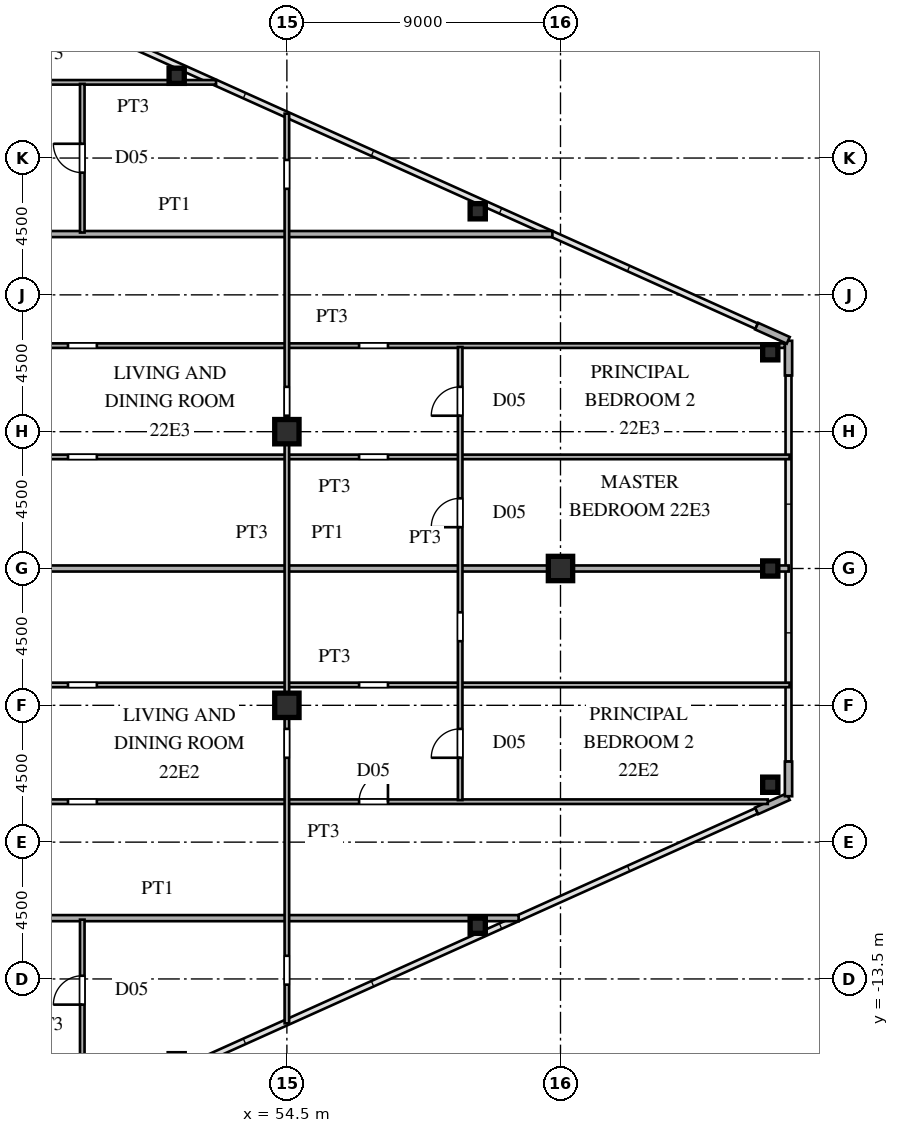
"""IFC4 building model, lengths in metres.
Left out: names, types, materials, properties, quantities, classifications, styles, units other than length and angle.
Written with IfcOpenShell. Run it as: python <this file> out.ifc"""

import sys

from ifc_helpers import new_model, si_unit, direction, frame, frame_2d, origin, origin_2d, place, context, subcontext, project, spatial, rectangle, hollow_rectangle, i_section, extrude, source, transform, mapped, element, fill, save


model = new_model("IFC4")
c1 = context("Model", 3, precision=1e-05, world=origin(), true_north=direction((0.0, 1.0)))
c2 = subcontext(c1, "Body", "Model", "MODEL_VIEW")
j1 = project(units=[si_unit("LENGTHUNIT", "METRE"), si_unit("PLANEANGLEUNIT", "RADIAN")], contexts=[c1])
p1 = place(None, origin())
s1 = spatial("IfcSite", under=j1, at=p1, CompositionType="ELEMENT")
p2 = place(p1, origin())
s2 = spatial("IfcBuilding", under=s1, at=p2, CompositionType="ELEMENT")
p3 = place(p2, frame((0.0, 0.0, 83.7)))
s3 = spatial("IfcBuildingStorey", under=s2, at=p3, CompositionType="ELEMENT", Elevation=83.7)
m1 = source(origin(), c2, "Body", "SweptSolid", [
    extrude(i_section(OverallWidth=0.8, OverallDepth=0.8, WebThickness=0.032, FlangeThickness=0.05, at=origin_2d()), origin(), (0.0, 0.0, 1.0), 3.6),
])
for number, where, z_axis, x_axis in (
    (1, (54.5, -4.5, 0.0), (0.0, 0.0, 1.0), (1.0, 0.0, 0.0)),
    (2, (54.5, 4.5, 0.0), (0.0, 0.0, 1.0), (1.0, 0.0, 0.0)),
    (3, (63.5, 0.0, 0.0), (0.0, 0.0, 1.0), (1.0, 0.0, 0.0)),
):
    element("IfcColumn", number, at=place(p3, frame(where, z_axis=z_axis, x_axis=x_axis)), inside=s3, PredefinedType="COLUMN", context=c2, shape_type="MappedRepresentation", body=[
        mapped(m1, transform((0.0, 0.0, 0.0), scale=1.0)),
    ])
m2 = source(origin(), c2, "Body", "SweptSolid", [
    extrude(hollow_rectangle(XDim=0.5, YDim=0.5, WallThickness=0.02, at=origin_2d()), origin(), (0.0, 0.0, 1.0), 3.6),
])
for number, where, z_axis, x_axis in (
    (4, (70.4, -7.112, 0.0), (0.0, 0.0, 1.0), (1.0, 0.0, 0.0)),
    (5, (70.4, 7.112, 0.0), (0.0, 0.0, 1.0), (1.0, 0.0, 0.0)),
    (6, (60.778, -11.749, 0.0), (0.0, 0.0, 1.0), (1.0, 0.0, 0.0)),
    (7, (50.875, 16.205, 0.0), (0.0, 0.0, 1.0), (1.0, 0.0, 0.0)),
    (8, (60.778, 11.749, 0.0), (0.0, 0.0, 1.0), (1.0, 0.0, 0.0)),
    (9, (70.4, 0.0, 0.0), (0.0, 0.0, 1.0), (1.0, 0.0, 0.0)),
):
    element("IfcColumn", number, at=place(p3, frame(where, z_axis=z_axis, x_axis=x_axis)), inside=s3, PredefinedType="COLUMN", context=c2, shape_type="MappedRepresentation", body=[
        mapped(m2, transform((0.0, 0.0, 0.0), scale=1.0)),
    ])
for number, where, z_axis, x_axis in (
    (10, (69.951, -7.972, 0.0), (0.0, 0.0, 1.0), (0.912, 0.41, 0.0)),
    (11, (71.0, -7.49, 0.0), (0.0, 0.0, 1.0), (0.0, 1.0, 0.0)),
    (12, (71.0, 6.35, 0.0), (0.0, 0.0, 1.0), (0.0, 1.0, 0.0)),
    (13, (70.991, 7.504, 0.0), (0.0, 0.0, 1.0), (-0.912, 0.41, 0.0)),
):
    element("IfcWall", number, at=place(p3, frame(where, z_axis=z_axis, x_axis=x_axis)), inside=s3, PredefinedType="SOLIDWALL", context=c2, shape_type="SweptSolid", body=[
        extrude(rectangle(XDim=1.14, YDim=0.24, at=frame_2d((0.57, 0.0))), origin(), (0.0, 0.0, 1.0), 3.34),
    ])
p4 = place(p3, frame((38.38, -11.5, 0.0), z_axis=(0.0, 0.0, 1.0), x_axis=(1.0, 0.0, 0.0)))
e14 = element("IfcWall", 14, at=p4, inside=s3, PredefinedType="PARTITIONING", context=c2, shape_type="SweptSolid", body=[
    extrude(rectangle(XDim=23.743, YDim=0.2, at=frame_2d((11.872, 0.0))), origin(), (0.0, 0.0, 1.0), 3.34),
])
p5 = place(p3, frame((41.1, -7.67, 0.0), z_axis=(0.0, 0.0, 1.0), x_axis=(1.0, 0.0, 0.0)))
e15 = element("IfcWall", 15, at=p5, inside=s3, PredefinedType="PARTITIONING", context=c2, shape_type="SweptSolid", body=[
    extrude(rectangle(XDim=29.218, YDim=0.15, at=frame_2d((14.609, 0.0))), origin(), (0.0, 0.0, 1.0), 3.34),
])
p6 = place(p5, frame((6.2, 0.0, 0.0)))
e16 = element("IfcOpeningElement", 16, at=p6, cuts=e15, PredefinedType="OPENING", context=c2, shape_type="SweptSolid", body=[
    extrude(rectangle(XDim=0.95, YDim=2.15, at=frame_2d((0.475, 1.075))), frame((0.0, 0.085, 0.0), z_axis=(0.0, -1.0, 0.0), x_axis=(1.0, 0.0, 0.0)), (0.0, 0.0, 1.0), 0.17),
])
p7 = place(p5, frame((15.775, 0.0, 0.0)))
e17 = element("IfcOpeningElement", 17, at=p7, cuts=e15, PredefinedType="OPENING", context=c2, shape_type="SweptSolid", body=[
    extrude(rectangle(XDim=0.95, YDim=2.15, at=frame_2d((0.475, 1.075))), frame((0.0, 0.085, 0.0), z_axis=(0.0, -1.0, 0.0), x_axis=(1.0, 0.0, 0.0)), (0.0, 0.0, 1.0), 0.17),
])
p8 = place(p3, frame((41.1, -3.83, 0.0), z_axis=(0.0, 0.0, 1.0), x_axis=(1.0, 0.0, 0.0)))
e18 = element("IfcWall", 18, at=p8, inside=s3, PredefinedType="PARTITIONING", context=c2, shape_type="SweptSolid", body=[
    extrude(rectangle(XDim=29.935, YDim=0.15, at=frame_2d((14.967, 0.0))), origin(), (0.0, 0.0, 1.0), 3.34),
])
p9 = place(p8, frame((6.2, 0.0, 0.0)))
e19 = element("IfcOpeningElement", 19, at=p9, cuts=e18, PredefinedType="OPENING", context=c2, shape_type="SweptSolid", body=[
    extrude(rectangle(XDim=0.95, YDim=2.15, at=frame_2d((0.475, 1.075))), frame((0.0, 0.085, 0.0), z_axis=(0.0, -1.0, 0.0), x_axis=(1.0, 0.0, 0.0)), (0.0, 0.0, 1.0), 0.17),
])
p10 = place(p8, frame((15.775, 0.0, 0.0)))
e20 = element("IfcOpeningElement", 20, at=p10, cuts=e18, PredefinedType="OPENING", context=c2, shape_type="SweptSolid", body=[
    extrude(rectangle(XDim=0.95, YDim=2.15, at=frame_2d((0.475, 1.075))), frame((0.0, 0.085, 0.0), z_axis=(0.0, -1.0, 0.0), x_axis=(1.0, 0.0, 0.0)), (0.0, 0.0, 1.0), 0.17),
])
p11 = place(p3, frame((38.38, 0.0, 0.0), z_axis=(0.0, 0.0, 1.0), x_axis=(1.0, 0.0, 0.0)))
e21 = element("IfcWall", 21, at=p11, inside=s3, PredefinedType="PARTITIONING", context=c2, shape_type="SweptSolid", body=[
    extrude(rectangle(XDim=25.1, YDim=0.2, at=frame_2d((12.55, 0.0))), origin(), (0.0, 0.0, 1.0), 3.34),
])
p12 = place(p3, frame((63.48, 0.0, 0.0), z_axis=(0.0, 0.0, 1.0), x_axis=(1.0, 0.0, 0.0)))
e22 = element("IfcWall", 22, at=p12, inside=s3, PredefinedType="PARTITIONING", context=c2, shape_type="SweptSolid", body=[
    extrude(rectangle(XDim=7.525, YDim=0.2, at=frame_2d((3.762, 0.0))), origin(), (0.0, 0.0, 1.0), 2.44),
])
p13 = place(p3, frame((41.1, 3.67, 0.0), z_axis=(0.0, 0.0, 1.0), x_axis=(1.0, 0.0, 0.0)))
e23 = element("IfcWall", 23, at=p13, inside=s3, PredefinedType="PARTITIONING", context=c2, shape_type="SweptSolid", body=[
    extrude(rectangle(XDim=29.935, YDim=0.15, at=frame_2d((14.967, 0.0))), origin(), (0.0, 0.0, 1.0), 3.34),
])
p14 = place(p13, frame((6.2, 0.0, 0.0)))
e24 = element("IfcOpeningElement", 24, at=p14, cuts=e23, PredefinedType="OPENING", context=c2, shape_type="SweptSolid", body=[
    extrude(rectangle(XDim=0.95, YDim=2.15, at=frame_2d((0.475, 1.075))), frame((0.0, 0.085, 0.0), z_axis=(0.0, -1.0, 0.0), x_axis=(1.0, 0.0, 0.0)), (0.0, 0.0, 1.0), 0.17),
])
p15 = place(p13, frame((15.775, 0.0, 0.0)))
e25 = element("IfcOpeningElement", 25, at=p15, cuts=e23, PredefinedType="OPENING", context=c2, shape_type="SweptSolid", body=[
    extrude(rectangle(XDim=0.95, YDim=2.15, at=frame_2d((0.475, 1.075))), frame((0.0, 0.085, 0.0), z_axis=(0.0, -1.0, 0.0), x_axis=(1.0, 0.0, 0.0)), (0.0, 0.0, 1.0), 0.17),
])
p16 = place(p3, frame((41.1, 7.33, 0.0), z_axis=(0.0, 0.0, 1.0), x_axis=(1.0, 0.0, 0.0)))
e26 = element("IfcWall", 26, at=p16, inside=s3, PredefinedType="PARTITIONING", context=c2, shape_type="SweptSolid", body=[
    extrude(rectangle(XDim=29.775, YDim=0.15, at=frame_2d((14.887, 0.0))), origin(), (0.0, 0.0, 1.0), 3.34),
])
p17 = place(p16, frame((6.2, 0.0, 0.0)))
e27 = element("IfcOpeningElement", 27, at=p17, cuts=e26, PredefinedType="OPENING", context=c2, shape_type="SweptSolid", body=[
    extrude(rectangle(XDim=0.95, YDim=2.15, at=frame_2d((0.475, 1.075))), frame((0.0, 0.085, 0.0), z_axis=(0.0, -1.0, 0.0), x_axis=(1.0, 0.0, 0.0)), (0.0, 0.0, 1.0), 0.17),
])
p18 = place(p16, frame((15.775, 0.0, 0.0)))
e28 = element("IfcOpeningElement", 28, at=p18, cuts=e26, PredefinedType="OPENING", context=c2, shape_type="SweptSolid", body=[
    extrude(rectangle(XDim=0.95, YDim=2.15, at=frame_2d((0.475, 1.075))), frame((0.0, 0.085, 0.0), z_axis=(0.0, -1.0, 0.0), x_axis=(1.0, 0.0, 0.0)), (0.0, 0.0, 1.0), 0.17),
])
p19 = place(p3, frame((38.38, 11.0, 0.0), z_axis=(0.0, 0.0, 1.0), x_axis=(1.0, 0.0, 0.0)))
e29 = element("IfcWall", 29, at=p19, inside=s3, PredefinedType="PARTITIONING", context=c2, shape_type="SweptSolid", body=[
    extrude(rectangle(XDim=24.854, YDim=0.2, at=frame_2d((12.427, 0.0))), origin(), (0.0, 0.0, 1.0), 3.34),
])
p20 = place(p3, frame((41.1, 15.99, 0.0), z_axis=(0.0, 0.0, 1.0), x_axis=(1.0, 0.0, 0.0)))
e30 = element("IfcWall", 30, at=p20, inside=s3, PredefinedType="PARTITIONING", context=c2, shape_type="SweptSolid", body=[
    extrude(rectangle(XDim=11.071, YDim=0.15, at=frame_2d((5.535, 0.0))), origin(), (0.0, 0.0, 1.0), 3.34),
])
p21 = place(p20, frame((2.837, 0.0, 0.0)))
e31 = element("IfcOpeningElement", 31, at=p21, cuts=e30, PredefinedType="OPENING", context=c2, shape_type="SweptSolid", body=[
    extrude(rectangle(XDim=0.95, YDim=2.15, at=frame_2d((0.475, 1.075))), frame((0.0, 0.085, 0.0), z_axis=(0.0, -1.0, 0.0), x_axis=(1.0, 0.0, 0.0)), (0.0, 0.0, 1.0), 0.17),
])
p22 = place(p3, frame((47.77, -16.189, 0.0), z_axis=(0.0, 0.0, 1.0), x_axis=(0.0, 1.0, 0.0)))
e32 = element("IfcWall", 32, at=p22, inside=s3, PredefinedType="PARTITIONING", context=c2, shape_type="SweptSolid", body=[
    extrude(rectangle(XDim=4.639, YDim=0.15, at=frame_2d((2.319, 0.0))), origin(), (0.0, 0.0, 1.0), 3.34),
])
p23 = place(p22, frame((1.844, 0.0, 0.0)))
e33 = element("IfcOpeningElement", 33, at=p23, cuts=e32, PredefinedType="OPENING", context=c2, shape_type="SweptSolid", body=[
    extrude(rectangle(XDim=0.95, YDim=2.15, at=frame_2d((0.475, 1.075))), frame((0.0, 0.085, 0.0), z_axis=(0.0, -1.0, 0.0), x_axis=(1.0, 0.0, 0.0)), (0.0, 0.0, 1.0), 0.17),
])
p24 = place(p3, frame((47.77, 11.05, 0.0), z_axis=(0.0, 0.0, 1.0), x_axis=(0.0, 1.0, 0.0)))
e34 = element("IfcWall", 34, at=p24, inside=s3, PredefinedType="PARTITIONING", context=c2, shape_type="SweptSolid", body=[
    extrude(rectangle(XDim=4.889, YDim=0.15, at=frame_2d((2.444, 0.0))), origin(), (0.0, 0.0, 1.0), 3.34),
])
p25 = place(p24, frame((1.969, 0.0, 0.0)))
e35 = element("IfcOpeningElement", 35, at=p25, cuts=e34, PredefinedType="OPENING", context=c2, shape_type="SweptSolid", body=[
    extrude(rectangle(XDim=0.95, YDim=2.15, at=frame_2d((0.475, 1.075))), frame((0.0, 0.085, 0.0), z_axis=(0.0, -1.0, 0.0), x_axis=(1.0, 0.0, 0.0)), (0.0, 0.0, 1.0), 0.17),
])
p26 = place(p3, frame((54.5, -14.96, 0.0), z_axis=(0.0, 0.0, 1.0), x_axis=(0.0, 1.0, 0.0)))
e36 = element("IfcWall", 36, at=p26, inside=s3, PredefinedType="PARTITIONING", context=c2, shape_type="SweptSolid", body=[
    extrude(rectangle(XDim=10.44, YDim=0.15, at=frame_2d((5.22, 0.0))), origin(), (0.0, 0.0, 1.0), 3.34),
])
p27 = place(p26, frame((1.272, 0.0, 0.0)))
e37 = element("IfcOpeningElement", 37, at=p27, cuts=e36, PredefinedType="OPENING", context=c2, shape_type="SweptSolid", body=[
    extrude(rectangle(XDim=0.95, YDim=2.15, at=frame_2d((0.475, 1.075))), frame((0.0, 0.085, 0.0), z_axis=(0.0, -1.0, 0.0), x_axis=(1.0, 0.0, 0.0)), (0.0, 0.0, 1.0), 0.17),
])
p28 = place(p26, frame((8.735, 0.0, 0.0)))
e38 = element("IfcOpeningElement", 38, at=p28, cuts=e36, PredefinedType="OPENING", context=c2, shape_type="SweptSolid", body=[
    extrude(rectangle(XDim=0.95, YDim=2.15, at=frame_2d((0.475, 1.075))), frame((0.0, 0.085, 0.0), z_axis=(0.0, -1.0, 0.0), x_axis=(1.0, 0.0, 0.0)), (0.0, 0.0, 1.0), 0.17),
])
p29 = place(p3, frame((54.5, -4.52, 0.0), z_axis=(0.0, 0.0, 1.0), x_axis=(0.0, 1.0, 0.0)))
e39 = element("IfcWall", 39, at=p29, inside=s3, PredefinedType="PARTITIONING", context=c2, shape_type="SweptSolid", body=[
    extrude(rectangle(XDim=9.04, YDim=0.15, at=frame_2d((4.52, 0.0))), origin(), (0.0, 0.0, 1.0), 2.44),
])
p30 = place(p3, frame((54.5, 4.52, 0.0), z_axis=(0.0, 0.0, 1.0), x_axis=(0.0, 1.0, 0.0)))
e40 = element("IfcWall", 40, at=p30, inside=s3, PredefinedType="PARTITIONING", context=c2, shape_type="SweptSolid", body=[
    extrude(rectangle(XDim=10.44, YDim=0.15, at=frame_2d((5.22, 0.0))), origin(), (0.0, 0.0, 1.0), 3.34),
])
p31 = place(p30, frame((0.505, 0.0, 0.0)))
e41 = element("IfcOpeningElement", 41, at=p31, cuts=e40, PredefinedType="OPENING", context=c2, shape_type="SweptSolid", body=[
    extrude(rectangle(XDim=0.95, YDim=2.15, at=frame_2d((0.475, 1.075))), frame((0.0, 0.085, 0.0), z_axis=(0.0, -1.0, 0.0), x_axis=(1.0, 0.0, 0.0)), (0.0, 0.0, 1.0), 0.17),
])
p32 = place(p30, frame((7.968, 0.0, 0.0)))
e42 = element("IfcOpeningElement", 42, at=p32, cuts=e40, PredefinedType="OPENING", context=c2, shape_type="SweptSolid", body=[
    extrude(rectangle(XDim=0.95, YDim=2.15, at=frame_2d((0.475, 1.075))), frame((0.0, 0.085, 0.0), z_axis=(0.0, -1.0, 0.0), x_axis=(1.0, 0.0, 0.0)), (0.0, 0.0, 1.0), 0.17),
])
p33 = place(p3, frame((60.2, -7.617, 0.0), z_axis=(0.0, 0.0, 1.0), x_axis=(0.0, 1.0, 0.0)))
e43 = element("IfcWall", 43, at=p33, inside=s3, PredefinedType="PARTITIONING", context=c2, shape_type="SweptSolid", body=[
    extrude(rectangle(XDim=14.9, YDim=0.15, at=frame_2d((7.45, 0.0))), origin(), (0.0, 0.0, 1.0), 3.34),
])
p34 = place(p33, frame((1.392, 0.0, 0.0)))
e44 = element("IfcOpeningElement", 44, at=p34, cuts=e43, PredefinedType="OPENING", context=c2, shape_type="SweptSolid", body=[
    extrude(rectangle(XDim=0.95, YDim=2.15, at=frame_2d((0.475, 1.075))), frame((0.0, 0.085, 0.0), z_axis=(0.0, -1.0, 0.0), x_axis=(1.0, 0.0, 0.0)), (0.0, 0.0, 1.0), 0.17),
])
p35 = place(p33, frame((5.225, 0.0, 0.0)))
e45 = element("IfcOpeningElement", 45, at=p35, cuts=e43, PredefinedType="OPENING", context=c2, shape_type="SweptSolid", body=[
    extrude(rectangle(XDim=0.95, YDim=2.15, at=frame_2d((0.475, 1.075))), frame((0.0, 0.085, 0.0), z_axis=(0.0, -1.0, 0.0), x_axis=(1.0, 0.0, 0.0)), (0.0, 0.0, 1.0), 0.17),
])
p36 = place(p33, frame((8.975, 0.0, 0.0)))
e46 = element("IfcOpeningElement", 46, at=p36, cuts=e43, PredefinedType="OPENING", context=c2, shape_type="SweptSolid", body=[
    extrude(rectangle(XDim=0.95, YDim=2.15, at=frame_2d((0.475, 1.075))), frame((0.0, 0.085, 0.0), z_axis=(0.0, -1.0, 0.0), x_axis=(1.0, 0.0, 0.0)), (0.0, 0.0, 1.0), 0.17),
])
p37 = place(p33, frame((12.642, 0.0, 0.0)))
e47 = element("IfcOpeningElement", 47, at=p37, cuts=e43, PredefinedType="OPENING", context=c2, shape_type="SweptSolid", body=[
    extrude(rectangle(XDim=0.95, YDim=2.15, at=frame_2d((0.475, 1.075))), frame((0.0, 0.085, 0.0), z_axis=(0.0, -1.0, 0.0), x_axis=(1.0, 0.0, 0.0)), (0.0, 0.0, 1.0), 0.17),
])
m3 = source(origin(), c2, "Body", "SweptSolid", [
    extrude(rectangle(XDim=0.95, YDim=2.15, at=frame_2d((0.475, 1.075))), frame((0.0, 0.025, 0.0), z_axis=(0.0, -1.0, 0.0), x_axis=(1.0, 0.0, 0.0)), (0.0, 0.0, 1.0), 0.05),
])
p38 = place(p7, origin())
e48 = element("IfcDoor", 48, at=p38, inside=s3, OperationType="SINGLE_SWING_RIGHT", PredefinedType="DOOR", context=c2, shape_type="MappedRepresentation", body=[
    mapped(m3, transform((0.0, 0.0, 0.0), scale=1.0)),
])
fill(e17, e48)
p39 = place(p23, origin())
e49 = element("IfcDoor", 49, at=p39, inside=s3, OperationType="SINGLE_SWING_LEFT", PredefinedType="DOOR", context=c2, shape_type="MappedRepresentation", body=[
    mapped(m3, transform((0.0, 0.0, 0.0), scale=1.0)),
])
fill(e33, e49)
p40 = place(p25, origin())
e50 = element("IfcDoor", 50, at=p40, inside=s3, OperationType="SINGLE_SWING_RIGHT", PredefinedType="DOOR", context=c2, shape_type="MappedRepresentation", body=[
    mapped(m3, transform((0.0, 0.0, 0.0), scale=1.0)),
])
fill(e35, e50)
p41 = place(p34, origin())
e51 = element("IfcDoor", 51, at=p41, inside=s3, OperationType="SINGLE_SWING_LEFT", PredefinedType="DOOR", context=c2, shape_type="MappedRepresentation", body=[
    mapped(m3, transform((0.0, 0.0, 0.0), scale=1.0)),
])
fill(e44, e51)
p42 = place(p36, origin())
e52 = element("IfcDoor", 52, at=p42, inside=s3, OperationType="SINGLE_SWING_LEFT", PredefinedType="DOOR", context=c2, shape_type="MappedRepresentation", body=[
    mapped(m3, transform((0.0, 0.0, 0.0), scale=1.0)),
])
fill(e46, e52)
p43 = place(p37, origin())
e53 = element("IfcDoor", 53, at=p43, inside=s3, OperationType="SINGLE_SWING_LEFT", PredefinedType="DOOR", context=c2, shape_type="MappedRepresentation", body=[
    mapped(m3, transform((0.0, 0.0, 0.0), scale=1.0)),
])
fill(e47, e53)
save(model, sys.argv[1])
